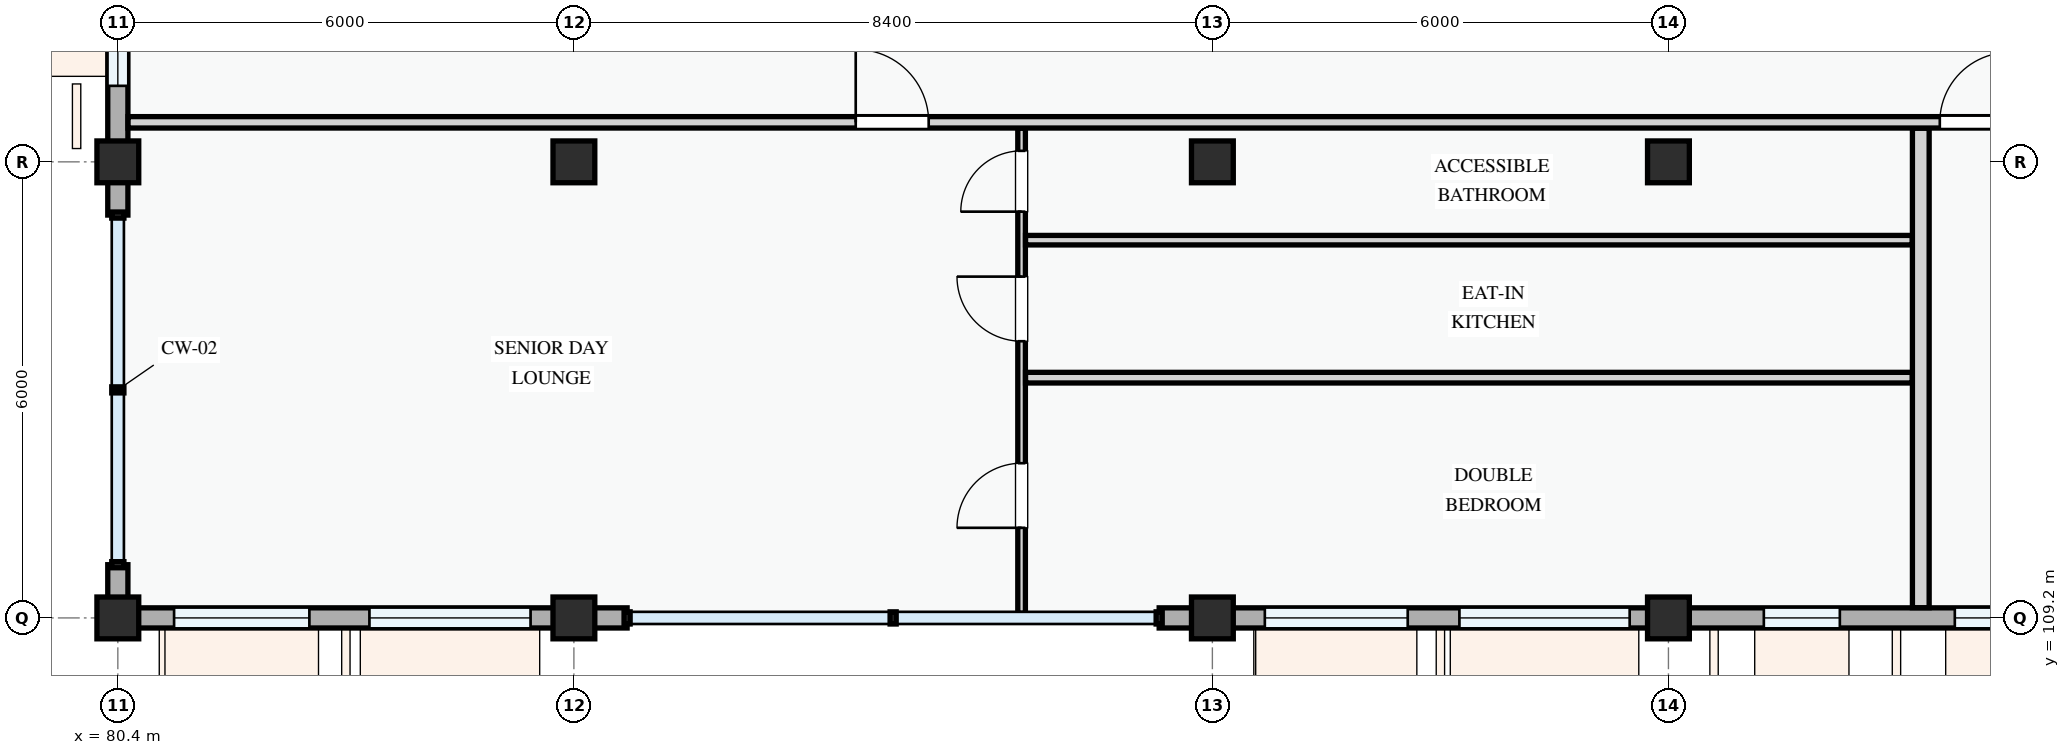
"""IFC4 building model, lengths in metres.
Left out: names, types, materials, properties, quantities, classifications, styles, units other than length and angle.
Written with IfcOpenShell. Run it as: python <this file> out.ifc"""

import sys

from ifc_helpers import new_model, si_unit, direction, frame, frame_2d, origin, origin_2d, place, context, subcontext, project, spatial, rectangle, extrude, element, fill, save


model = new_model("IFC4")
c1 = context("Model", 3, precision=1e-05, world=origin(), true_north=direction((0.0, 1.0)))
c2 = subcontext(c1, "Body", "Model", "MODEL_VIEW")
j1 = project(units=[si_unit("LENGTHUNIT", "METRE"), si_unit("PLANEANGLEUNIT", "RADIAN")], contexts=[c1])
p1 = place(None, origin())
s1 = spatial("IfcSite", under=j1, at=p1, CompositionType="ELEMENT")
p2 = place(p1, origin())
s2 = spatial("IfcBuilding", under=s1, at=p2, CompositionType="ELEMENT")
p3 = place(p2, frame((0.0, 0.0, 31.2)))
s3 = spatial("IfcBuildingStorey", under=s2, at=p3, CompositionType="ELEMENT", Elevation=31.2)
for number, where, z_axis, x_axis in (
    (1, (80.4, 109.2, 0.0), (0.0, 0.0, 1.0), (1.0, 0.0, 0.0)),
    (2, (80.4, 115.2, 0.0), (0.0, 0.0, 1.0), (1.0, 0.0, 0.0)),
    (3, (86.4, 109.2, 0.0), (0.0, 0.0, 1.0), (1.0, 0.0, 0.0)),
    (4, (86.4, 115.2, 0.0), (0.0, 0.0, 1.0), (1.0, 0.0, 0.0)),
    (5, (94.8, 109.2, 0.0), (0.0, 0.0, 1.0), (1.0, 0.0, 0.0)),
    (6, (94.8, 115.2, 0.0), (0.0, 0.0, 1.0), (1.0, 0.0, 0.0)),
    (7, (100.8, 109.2, 0.0), (0.0, 0.0, 1.0), (1.0, 0.0, 0.0)),
    (8, (100.8, 115.2, 0.0), (0.0, 0.0, 1.0), (1.0, 0.0, 0.0)),
):
    element("IfcColumn", number, at=place(p3, frame(where, z_axis=z_axis, x_axis=x_axis)), inside=s3, PredefinedType="COLUMN", context=c2, shape_type="SweptSolid", body=[
        extrude(rectangle(XDim=0.55, YDim=0.55, at=origin_2d()), origin(), (0.0, 0.0, 1.0), 3.3),
    ])
p4 = place(p3, frame((80.4, 123.6, 0.0), z_axis=(0.0, 0.0, 1.0), x_axis=(0.0, -1.0, 0.0)))
e9 = element("IfcWall", 9, at=p4, inside=s3, PredefinedType="STANDARD", context=c2, shape_type="SweptSolid", body=[
    extrude(rectangle(XDim=8.4, YDim=0.265, at=frame_2d((4.2, 0.0))), origin(), (0.0, 0.0, 1.0), 2.425),
])
p5 = place(p4, frame((0.933, 0.0, 0.78)))
e10 = element("IfcOpeningElement", 10, at=p5, cuts=e9, PredefinedType="OPENING", context=c2, shape_type="SweptSolid", body=[
    extrude(rectangle(XDim=1.5, YDim=1.5, at=frame_2d((0.75, 0.75))), frame((0.0, 0.143, 0.0), z_axis=(0.0, -1.0, 0.0), x_axis=(1.0, 0.0, 0.0)), (0.0, 0.0, 1.0), 0.285),
])
p6 = place(p4, frame((4.052, 0.0, 0.78)))
e11 = element("IfcOpeningElement", 11, at=p6, cuts=e9, PredefinedType="OPENING", context=c2, shape_type="SweptSolid", body=[
    extrude(rectangle(XDim=0.95, YDim=1.15, at=frame_2d((0.475, 0.575))), frame((0.0, 0.143, 0.0), z_axis=(0.0, -1.0, 0.0), x_axis=(1.0, 0.0, 0.0)), (0.0, 0.0, 1.0), 0.285),
])
p7 = place(p4, frame((6.5, 0.0, 0.78)))
e12 = element("IfcOpeningElement", 12, at=p7, cuts=e9, PredefinedType="OPENING", context=c2, shape_type="SweptSolid", body=[
    extrude(rectangle(XDim=0.9, YDim=1.2, at=frame_2d((0.45, 0.6))), frame((0.0, 0.143, 0.0), z_axis=(0.0, -1.0, 0.0), x_axis=(1.0, 0.0, 0.0)), (0.0, 0.0, 1.0), 0.285),
])
p8 = place(p3, frame((80.4, 115.2, 0.0), z_axis=(0.0, 0.0, 1.0), x_axis=(0.0, -1.0, 0.0)))
e13 = element("IfcWall", 13, at=p8, inside=s3, PredefinedType="STANDARD", context=c2, shape_type="SweptSolid", body=[
    extrude(rectangle(XDim=0.7, YDim=0.265, at=frame_2d((0.35, 0.0))), origin(), (0.0, 0.0, 1.0), 2.575),
])
p9 = place(p3, frame((80.4, 109.9, 0.0), z_axis=(0.0, 0.0, 1.0), x_axis=(0.0, -1.0, 0.0)))
e14 = element("IfcWall", 14, at=p9, inside=s3, PredefinedType="STANDARD", context=c2, shape_type="SweptSolid", body=[
    extrude(rectangle(XDim=0.565, YDim=0.265, at=frame_2d((0.283, 0.0))), origin(), (0.0, 0.0, 1.0), 2.575),
])
p10 = place(p3, frame((80.4, 109.2, 0.0), z_axis=(0.0, 0.0, 1.0), x_axis=(1.0, 0.0, 0.0)))
e15 = element("IfcWall", 15, at=p10, inside=s3, PredefinedType="STANDARD", context=c2, shape_type="SweptSolid", body=[
    extrude(rectangle(XDim=6.0, YDim=0.265, at=frame_2d((3.0, 0.0))), origin(), (0.0, 0.0, 1.0), 2.525),
])
p11 = place(p10, frame((0.74, 0.0, 0.78)))
e16 = element("IfcOpeningElement", 16, at=p11, cuts=e15, PredefinedType="OPENING", context=c2, shape_type="SweptSolid", body=[
    extrude(rectangle(XDim=1.78, YDim=1.42, at=frame_2d((0.89, 0.71))), frame((0.0, 0.143, 0.0), z_axis=(0.0, -1.0, 0.0), x_axis=(1.0, 0.0, 0.0)), (0.0, 0.0, 1.0), 0.285),
])
p12 = place(p10, frame((3.31, 0.0, 0.78)))
e17 = element("IfcOpeningElement", 17, at=p12, cuts=e15, PredefinedType="OPENING", context=c2, shape_type="SweptSolid", body=[
    extrude(rectangle(XDim=2.12, YDim=1.44, at=frame_2d((1.06, 0.72))), frame((0.0, 0.143, 0.0), z_axis=(0.0, -1.0, 0.0), x_axis=(1.0, 0.0, 0.0)), (0.0, 0.0, 1.0), 0.285),
])
p13 = place(p3, frame((86.4, 109.2, 0.0), z_axis=(0.0, 0.0, 1.0), x_axis=(1.0, 0.0, 0.0)))
e18 = element("IfcWall", 18, at=p13, inside=s3, PredefinedType="STANDARD", context=c2, shape_type="SweptSolid", body=[
    extrude(rectangle(XDim=0.7, YDim=0.265, at=frame_2d((0.35, 0.0))), origin(), (0.0, 0.0, 1.0), 2.375),
])
p14 = place(p3, frame((94.1, 109.2, 0.0), z_axis=(0.0, 0.0, 1.0), x_axis=(1.0, 0.0, 0.0)))
e19 = element("IfcWall", 19, at=p14, inside=s3, PredefinedType="STANDARD", context=c2, shape_type="SweptSolid", body=[
    extrude(rectangle(XDim=0.7, YDim=0.265, at=frame_2d((0.35, 0.0))), origin(), (0.0, 0.0, 1.0), 2.375),
])
p15 = place(p3, frame((94.8, 109.2, 0.0), z_axis=(0.0, 0.0, 1.0), x_axis=(1.0, 0.0, 0.0)))
e20 = element("IfcWall", 20, at=p15, inside=s3, PredefinedType="STANDARD", context=c2, shape_type="SweptSolid", body=[
    extrude(rectangle(XDim=6.0, YDim=0.265, at=frame_2d((3.0, 0.0))), origin(), (0.0, 0.0, 1.0), 2.525),
])
p16 = place(p15, frame((0.69, 0.0, 0.78)))
e21 = element("IfcOpeningElement", 21, at=p16, cuts=e20, PredefinedType="OPENING", context=c2, shape_type="SweptSolid", body=[
    extrude(rectangle(XDim=1.88, YDim=1.52, at=frame_2d((0.94, 0.76))), frame((0.0, 0.143, 0.0), z_axis=(0.0, -1.0, 0.0), x_axis=(1.0, 0.0, 0.0)), (0.0, 0.0, 1.0), 0.285),
])
p17 = place(p15, frame((3.25, 0.0, 0.78)))
e22 = element("IfcOpeningElement", 22, at=p17, cuts=e20, PredefinedType="OPENING", context=c2, shape_type="SweptSolid", body=[
    extrude(rectangle(XDim=2.24, YDim=1.52, at=frame_2d((1.12, 0.76))), frame((0.0, 0.143, 0.0), z_axis=(0.0, -1.0, 0.0), x_axis=(1.0, 0.0, 0.0)), (0.0, 0.0, 1.0), 0.285),
])
p18 = place(p3, frame((100.8, 109.2, 0.0), z_axis=(0.0, 0.0, 1.0), x_axis=(1.0, 0.0, 0.0)))
e23 = element("IfcWall", 23, at=p18, inside=s3, PredefinedType="STANDARD", context=c2, shape_type="SweptSolid", body=[
    extrude(rectangle(XDim=8.4, YDim=0.265, at=frame_2d((4.2, 0.0))), origin(), (0.0, 0.0, 1.0), 2.375),
])
p19 = place(p18, frame((1.255, 0.0, 0.78)))
e24 = element("IfcOpeningElement", 24, at=p19, cuts=e23, PredefinedType="OPENING", context=c2, shape_type="SweptSolid", body=[
    extrude(rectangle(XDim=1.0, YDim=1.25, at=frame_2d((0.5, 0.625))), frame((0.0, 0.143, 0.0), z_axis=(0.0, -1.0, 0.0), x_axis=(1.0, 0.0, 0.0)), (0.0, 0.0, 1.0), 0.285),
])
p20 = place(p18, frame((3.768, 0.0, 0.78)))
e25 = element("IfcOpeningElement", 25, at=p20, cuts=e23, PredefinedType="OPENING", context=c2, shape_type="SweptSolid", body=[
    extrude(rectangle(XDim=1.62, YDim=1.38, at=frame_2d((0.81, 0.69))), frame((0.0, 0.143, 0.0), z_axis=(0.0, -1.0, 0.0), x_axis=(1.0, 0.0, 0.0)), (0.0, 0.0, 1.0), 0.285),
])
p21 = place(p18, frame((6.403, 0.0, 0.78)))
e26 = element("IfcOpeningElement", 26, at=p21, cuts=e23, PredefinedType="OPENING", context=c2, shape_type="SweptSolid", body=[
    extrude(rectangle(XDim=1.1, YDim=1.3, at=frame_2d((0.55, 0.65))), frame((0.0, 0.143, 0.0), z_axis=(0.0, -1.0, 0.0), x_axis=(1.0, 0.0, 0.0)), (0.0, 0.0, 1.0), 0.285),
])
p22 = place(p3, frame((92.29, 109.26, 0.0), z_axis=(0.0, 0.0, 1.0), x_axis=(0.0, 1.0, 0.0)))
e27 = element("IfcWall", 27, at=p22, inside=s3, PredefinedType="PARTITIONING", context=c2, shape_type="SweptSolid", body=[
    extrude(rectangle(XDim=6.383, YDim=0.1, at=frame_2d((3.191, 0.0))), origin(), (0.0, 0.0, 1.0), 3.0),
])
p23 = place(p22, frame((1.125, 0.0, 0.0)))
e28 = element("IfcOpeningElement", 28, at=p23, cuts=e27, PredefinedType="OPENING", context=c2, shape_type="SweptSolid", body=[
    extrude(rectangle(XDim=0.85, YDim=2.1, at=frame_2d((0.425, 1.05))), frame((0.0, 0.06, 0.0), z_axis=(0.0, -1.0, 0.0), x_axis=(1.0, 0.0, 0.0)), (0.0, 0.0, 1.0), 0.12),
])
p24 = place(p22, frame((3.58, 0.0, 0.0)))
e29 = element("IfcOpeningElement", 29, at=p24, cuts=e27, PredefinedType="OPENING", context=c2, shape_type="SweptSolid", body=[
    extrude(rectangle(XDim=0.85, YDim=2.1, at=frame_2d((0.425, 1.05))), frame((0.0, 0.06, 0.0), z_axis=(0.0, -1.0, 0.0), x_axis=(1.0, 0.0, 0.0)), (0.0, 0.0, 1.0), 0.12),
])
p25 = place(p22, frame((5.285, 0.0, 0.0)))
e30 = element("IfcOpeningElement", 30, at=p25, cuts=e27, PredefinedType="OPENING", context=c2, shape_type="SweptSolid", body=[
    extrude(rectangle(XDim=0.8, YDim=2.1, at=frame_2d((0.4, 1.05))), frame((0.0, 0.06, 0.0), z_axis=(0.0, -1.0, 0.0), x_axis=(1.0, 0.0, 0.0)), (0.0, 0.0, 1.0), 0.12),
])
p26 = place(p3, frame((92.342, 112.361, 0.0), z_axis=(0.0, 0.0, 1.0), x_axis=(1.0, 0.0, 0.0)))
e31 = element("IfcWall", 31, at=p26, inside=s3, PredefinedType="PARTITIONING", context=c2, shape_type="SweptSolid", body=[
    extrude(rectangle(XDim=11.666, YDim=0.14, at=frame_2d((5.833, 0.0))), origin(), (0.0, 0.0, 1.0), 3.0),
])
p27 = place(p3, frame((92.342, 114.17, 0.0), z_axis=(0.0, 0.0, 1.0), x_axis=(1.0, 0.0, 0.0)))
e32 = element("IfcWall", 32, at=p27, inside=s3, PredefinedType="PARTITIONING", context=c2, shape_type="SweptSolid", body=[
    extrude(rectangle(XDim=11.666, YDim=0.125, at=frame_2d((5.833, 0.0))), origin(), (0.0, 0.0, 1.0), 3.0),
])
p28 = place(p3, frame((104.12, 109.334, 0.0), z_axis=(0.0, 0.0, 1.0), x_axis=(0.0, 1.0, 0.0)))
e33 = element("IfcWall", 33, at=p28, inside=s3, PredefinedType="PARTITIONING", context=c2, shape_type="SweptSolid", body=[
    extrude(rectangle(XDim=6.309, YDim=0.22, at=frame_2d((3.154, 0.0))), origin(), (0.0, 0.0, 1.0), 3.0),
])
p29 = place(p3, frame((80.534, 115.72, 0.0), z_axis=(0.0, 0.0, 1.0), x_axis=(1.0, 0.0, 0.0)))
e34 = element("IfcWall", 34, at=p29, inside=s3, PredefinedType="PARTITIONING", context=c2, shape_type="SweptSolid", body=[
    extrude(rectangle(XDim=69.516, YDim=0.15, at=frame_2d((34.758, 0.0))), origin(), (0.0, 0.0, 1.0), 3.0),
])
p30 = place(p29, frame((9.573, 0.0, 0.0)))
e35 = element("IfcOpeningElement", 35, at=p30, cuts=e34, PredefinedType="OPENING", context=c2, shape_type="SweptSolid", body=[
    extrude(rectangle(XDim=0.96, YDim=2.12, at=frame_2d((0.48, 1.06))), frame((0.0, 0.085, 0.0), z_axis=(0.0, -1.0, 0.0), x_axis=(1.0, 0.0, 0.0)), (0.0, 0.0, 1.0), 0.17),
])
p31 = place(p29, frame((23.835, 0.0, 0.0)))
e36 = element("IfcOpeningElement", 36, at=p31, cuts=e34, PredefinedType="OPENING", context=c2, shape_type="SweptSolid", body=[
    extrude(rectangle(XDim=0.92, YDim=2.1, at=frame_2d((0.46, 1.05))), frame((0.0, 0.085, 0.0), z_axis=(0.0, -1.0, 0.0), x_axis=(1.0, 0.0, 0.0)), (0.0, 0.0, 1.0), 0.17),
])
p32 = place(p29, frame((52.783, 0.0, 0.0)))
e37 = element("IfcOpeningElement", 37, at=p32, cuts=e34, PredefinedType="OPENING", context=c2, shape_type="SweptSolid", body=[
    extrude(rectangle(XDim=0.92, YDim=2.1, at=frame_2d((0.46, 1.05))), frame((0.0, 0.085, 0.0), z_axis=(0.0, -1.0, 0.0), x_axis=(1.0, 0.0, 0.0)), (0.0, 0.0, 1.0), 0.17),
])
p33 = place(p7, origin())
e38 = element("IfcWindow", 38, at=p33, inside=s3, PartitioningType="SINGLE_PANEL", PredefinedType="WINDOW", context=c2, shape_type="SweptSolid", body=[
    extrude(rectangle(XDim=0.9, YDim=1.2, at=frame_2d((0.45, 0.6))), frame((0.0, 0.03, 0.0), z_axis=(0.0, -1.0, 0.0), x_axis=(1.0, 0.0, 0.0)), (0.0, 0.0, 1.0), 0.06),
])
fill(e12, e38)
p34 = place(p11, origin())
e39 = element("IfcWindow", 39, at=p34, inside=s3, PartitioningType="DOUBLE_PANEL_VERTICAL", PredefinedType="WINDOW", context=c2, shape_type="SweptSolid", body=[
    extrude(rectangle(XDim=1.78, YDim=1.42, at=frame_2d((0.89, 0.71))), frame((0.0, 0.03, 0.0), z_axis=(0.0, -1.0, 0.0), x_axis=(1.0, 0.0, 0.0)), (0.0, 0.0, 1.0), 0.06),
])
fill(e16, e39)
p35 = place(p12, origin())
e40 = element("IfcWindow", 40, at=p35, inside=s3, PartitioningType="DOUBLE_PANEL_VERTICAL", PredefinedType="WINDOW", context=c2, shape_type="SweptSolid", body=[
    extrude(rectangle(XDim=2.12, YDim=1.44, at=frame_2d((1.06, 0.72))), frame((0.0, 0.03, 0.0), z_axis=(0.0, -1.0, 0.0), x_axis=(1.0, 0.0, 0.0)), (0.0, 0.0, 1.0), 0.06),
])
fill(e17, e40)
p36 = place(p16, origin())
e41 = element("IfcWindow", 41, at=p36, inside=s3, PartitioningType="DOUBLE_PANEL_VERTICAL", PredefinedType="WINDOW", context=c2, shape_type="SweptSolid", body=[
    extrude(rectangle(XDim=1.88, YDim=1.52, at=frame_2d((0.94, 0.76))), frame((0.0, 0.03, 0.0), z_axis=(0.0, -1.0, 0.0), x_axis=(1.0, 0.0, 0.0)), (0.0, 0.0, 1.0), 0.06),
])
fill(e21, e41)
p37 = place(p17, origin())
e42 = element("IfcWindow", 42, at=p37, inside=s3, PartitioningType="DOUBLE_PANEL_VERTICAL", PredefinedType="WINDOW", context=c2, shape_type="SweptSolid", body=[
    extrude(rectangle(XDim=2.24, YDim=1.52, at=frame_2d((1.12, 0.76))), frame((0.0, 0.03, 0.0), z_axis=(0.0, -1.0, 0.0), x_axis=(1.0, 0.0, 0.0)), (0.0, 0.0, 1.0), 0.06),
])
fill(e22, e42)
p38 = place(p19, origin())
e43 = element("IfcWindow", 43, at=p38, inside=s3, PartitioningType="SINGLE_PANEL", PredefinedType="WINDOW", context=c2, shape_type="SweptSolid", body=[
    extrude(rectangle(XDim=1.0, YDim=1.25, at=frame_2d((0.5, 0.625))), frame((0.0, 0.03, 0.0), z_axis=(0.0, -1.0, 0.0), x_axis=(1.0, 0.0, 0.0)), (0.0, 0.0, 1.0), 0.06),
])
fill(e24, e43)
p39 = place(p20, origin())
e44 = element("IfcWindow", 44, at=p39, inside=s3, PartitioningType="DOUBLE_PANEL_VERTICAL", PredefinedType="WINDOW", context=c2, shape_type="SweptSolid", body=[
    extrude(rectangle(XDim=1.62, YDim=1.38, at=frame_2d((0.81, 0.69))), frame((0.0, 0.03, 0.0), z_axis=(0.0, -1.0, 0.0), x_axis=(1.0, 0.0, 0.0)), (0.0, 0.0, 1.0), 0.06),
])
fill(e25, e44)
p40 = place(p23, origin())
e45 = element("IfcDoor", 45, at=p40, inside=s3, OperationType="SINGLE_SWING_LEFT", PredefinedType="DOOR", context=c2, shape_type="SweptSolid", body=[
    extrude(rectangle(XDim=0.85, YDim=2.1, at=frame_2d((0.425, 1.05))), frame((0.0, 0.025, 0.0), z_axis=(0.0, -1.0, 0.0), x_axis=(1.0, 0.0, 0.0)), (0.0, 0.0, 1.0), 0.05),
])
fill(e28, e45)
p41 = place(p24, origin())
e46 = element("IfcDoor", 46, at=p41, inside=s3, OperationType="SINGLE_SWING_RIGHT", PredefinedType="DOOR", context=c2, shape_type="SweptSolid", body=[
    extrude(rectangle(XDim=0.85, YDim=2.1, at=frame_2d((0.425, 1.05))), frame((0.0, 0.025, 0.0), z_axis=(0.0, -1.0, 0.0), x_axis=(1.0, 0.0, 0.0)), (0.0, 0.0, 1.0), 0.05),
])
fill(e29, e46)
p42 = place(p25, origin())
e47 = element("IfcDoor", 47, at=p42, inside=s3, OperationType="SINGLE_SWING_LEFT", PredefinedType="DOOR", context=c2, shape_type="SweptSolid", body=[
    extrude(rectangle(XDim=0.8, YDim=2.1, at=frame_2d((0.4, 1.05))), frame((0.0, 0.025, 0.0), z_axis=(0.0, -1.0, 0.0), x_axis=(1.0, 0.0, 0.0)), (0.0, 0.0, 1.0), 0.05),
])
fill(e30, e47)
p43 = place(p30, origin())
e48 = element("IfcDoor", 48, at=p43, inside=s3, OperationType="SINGLE_SWING_LEFT", PredefinedType="DOOR", context=c2, shape_type="SweptSolid", body=[
    extrude(rectangle(XDim=0.96, YDim=2.12, at=frame_2d((0.48, 1.06))), frame((0.0, 0.025, 0.0), z_axis=(0.0, -1.0, 0.0), x_axis=(1.0, 0.0, 0.0)), (0.0, 0.0, 1.0), 0.05),
])
fill(e35, e48)
p44 = place(p31, origin())
e49 = element("IfcDoor", 49, at=p44, inside=s3, OperationType="SINGLE_SWING_RIGHT", PredefinedType="DOOR", context=c2, shape_type="SweptSolid", body=[
    extrude(rectangle(XDim=0.92, YDim=2.1, at=frame_2d((0.46, 1.05))), frame((0.0, 0.025, 0.0), z_axis=(0.0, -1.0, 0.0), x_axis=(1.0, 0.0, 0.0)), (0.0, 0.0, 1.0), 0.05),
])
fill(e36, e49)
save(model, sys.argv[1])
